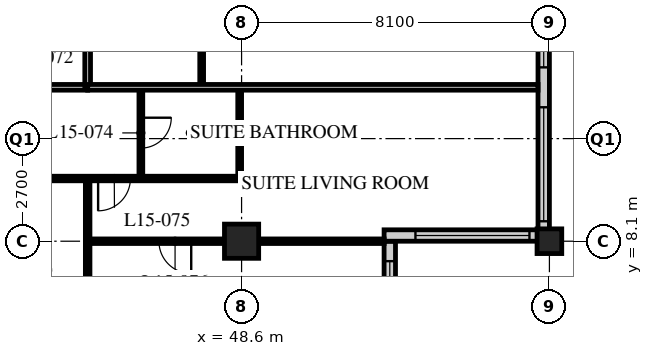
"""IFC4 building model, lengths in metres.
Left out: names, types, materials, properties, quantities, classifications, styles, units other than length and angle.
Written with IfcOpenShell. Run it as: python <this file> out.ifc"""

import sys

from ifc_helpers import new_model, si_unit, direction, frame, frame_2d, origin, origin_2d, place, context, subcontext, project, spatial, rectangle, hollow_rectangle, extrude, element, fill, save


model = new_model("IFC4")
c1 = context("Model", 3, precision=1e-05, world=origin(), true_north=direction((0.0, 1.0)))
c2 = subcontext(c1, "Body", "Model", "MODEL_VIEW")
j1 = project(units=[si_unit("LENGTHUNIT", "METRE"), si_unit("PLANEANGLEUNIT", "RADIAN")], contexts=[c1])
p1 = place(None, origin())
s1 = spatial("IfcSite", under=j1, at=p1, CompositionType="ELEMENT")
p2 = place(p1, origin())
s2 = spatial("IfcBuilding", under=s1, at=p2, CompositionType="ELEMENT")
p3 = place(p2, frame((0.0, 0.0, 63.6)))
s3 = spatial("IfcBuildingStorey", under=s2, at=p3, CompositionType="ELEMENT", Elevation=63.6)
p4 = place(p3, frame((48.6, 8.1, 0.0), z_axis=(0.0, 0.0, 1.0), x_axis=(1.0, 0.0, 0.0)))
e1 = element("IfcColumn", 1, at=p4, inside=s3, PredefinedType="COLUMN", context=c2, shape_type="SweptSolid", body=[
    extrude(hollow_rectangle(XDim=0.9, YDim=0.9, WallThickness=0.09, at=origin_2d()), origin(), (0.0, 0.0, 1.0), 3.4),
])
p5 = place(p3, frame((56.7, 8.1, 0.0), z_axis=(0.0, 0.0, 1.0), x_axis=(1.0, 0.0, 0.0)))
e2 = element("IfcColumn", 2, at=p5, inside=s3, PredefinedType="COLUMN", context=c2, shape_type="SweptSolid", body=[
    extrude(hollow_rectangle(XDim=0.65, YDim=0.65, WallThickness=0.05, at=origin_2d()), origin(), (0.0, 0.0, 1.0), 3.4),
])
p6 = place(p3, frame((52.5, 4.35, 0.0), z_axis=(0.0, 0.0, 1.0), x_axis=(0.0, 1.0, 0.0)))
e3 = element("IfcWall", 3, at=p6, inside=s3, PredefinedType="SOLIDWALL", context=c2, shape_type="SweptSolid", body=[
    extrude(rectangle(XDim=3.75, YDim=0.3, at=frame_2d((1.875, 0.0))), origin(), (0.0, 0.0, 1.0), 3.19),
])
p7 = place(p6, frame((0.225, 0.0, 0.9)))
e4 = element("IfcOpeningElement", 4, at=p7, cuts=e3, PredefinedType="OPENING", context=c2, shape_type="SweptSolid", body=[
    extrude(rectangle(XDim=3.0, YDim=1.5, at=frame_2d((1.5, 0.75))), frame((0.0, 0.16, 0.0), z_axis=(0.0, -1.0, 0.0), x_axis=(1.0, 0.0, 0.0)), (0.0, 0.0, 1.0), 0.32),
])
p8 = place(p3, frame((52.35, 8.25, 0.0), z_axis=(0.0, 0.0, 1.0), x_axis=(1.0, 0.0, 0.0)))
e5 = element("IfcWall", 5, at=p8, inside=s3, PredefinedType="SOLIDWALL", context=c2, shape_type="SweptSolid", body=[
    extrude(rectangle(XDim=4.35, YDim=0.3, at=frame_2d((2.175, 0.0))), origin(), (0.0, 0.0, 1.0), 3.19),
])
p9 = place(p8, frame((0.825, 0.0, 0.9)))
e6 = element("IfcOpeningElement", 6, at=p9, cuts=e5, PredefinedType="OPENING", context=c2, shape_type="SweptSolid", body=[
    extrude(rectangle(XDim=3.0, YDim=1.5, at=frame_2d((1.5, 0.75))), frame((0.0, 0.16, 0.0), z_axis=(0.0, -1.0, 0.0), x_axis=(1.0, 0.0, 0.0)), (0.0, 0.0, 1.0), 0.32),
])
p10 = place(p3, frame((56.55, 8.4, 0.0), z_axis=(0.0, 0.0, 1.0), x_axis=(0.0, 1.0, 0.0)))
e7 = element("IfcWall", 7, at=p10, inside=s3, PredefinedType="SOLIDWALL", context=c2, shape_type="SweptSolid", body=[
    extrude(rectangle(XDim=32.1, YDim=0.3, at=frame_2d((16.05, 0.0))), origin(), (0.0, 0.0, 1.0), 3.19),
])
p11 = place(p10, frame((0.225, 0.0, 0.9)))
e8 = element("IfcOpeningElement", 8, at=p11, cuts=e7, PredefinedType="OPENING", context=c2, shape_type="SweptSolid", body=[
    extrude(rectangle(XDim=3.0, YDim=2.0, at=frame_2d((1.5, 1.0))), frame((0.0, 0.16, 0.0), z_axis=(0.0, -1.0, 0.0), x_axis=(1.0, 0.0, 0.0)), (0.0, 0.0, 1.0), 0.32),
])
p12 = place(p10, frame((4.275, 0.0, 0.9)))
e9 = element("IfcOpeningElement", 9, at=p12, cuts=e7, PredefinedType="OPENING", context=c2, shape_type="SweptSolid", body=[
    extrude(rectangle(XDim=3.0, YDim=2.0, at=frame_2d((1.5, 1.0))), frame((0.0, 0.16, 0.0), z_axis=(0.0, -1.0, 0.0), x_axis=(1.0, 0.0, 0.0)), (0.0, 0.0, 1.0), 0.32),
])
p13 = place(p10, frame((8.325, 0.0, 0.9)))
e10 = element("IfcOpeningElement", 10, at=p13, cuts=e7, PredefinedType="OPENING", context=c2, shape_type="SweptSolid", body=[
    extrude(rectangle(XDim=3.0, YDim=2.0, at=frame_2d((1.5, 1.0))), frame((0.0, 0.16, 0.0), z_axis=(0.0, -1.0, 0.0), x_axis=(1.0, 0.0, 0.0)), (0.0, 0.0, 1.0), 0.32),
])
p14 = place(p10, frame((12.375, 0.0, 0.9)))
e11 = element("IfcOpeningElement", 11, at=p14, cuts=e7, PredefinedType="OPENING", context=c2, shape_type="SweptSolid", body=[
    extrude(rectangle(XDim=3.0, YDim=2.0, at=frame_2d((1.5, 1.0))), frame((0.0, 0.16, 0.0), z_axis=(0.0, -1.0, 0.0), x_axis=(1.0, 0.0, 0.0)), (0.0, 0.0, 1.0), 0.32),
])
p15 = place(p10, frame((16.425, 0.0, 0.9)))
e12 = element("IfcOpeningElement", 12, at=p15, cuts=e7, PredefinedType="OPENING", context=c2, shape_type="SweptSolid", body=[
    extrude(rectangle(XDim=3.0, YDim=2.0, at=frame_2d((1.5, 1.0))), frame((0.0, 0.16, 0.0), z_axis=(0.0, -1.0, 0.0), x_axis=(1.0, 0.0, 0.0)), (0.0, 0.0, 1.0), 0.32),
])
p16 = place(p10, frame((20.475, 0.0, 0.9)))
e13 = element("IfcOpeningElement", 13, at=p16, cuts=e7, PredefinedType="OPENING", context=c2, shape_type="SweptSolid", body=[
    extrude(rectangle(XDim=3.0, YDim=2.0, at=frame_2d((1.5, 1.0))), frame((0.0, 0.16, 0.0), z_axis=(0.0, -1.0, 0.0), x_axis=(1.0, 0.0, 0.0)), (0.0, 0.0, 1.0), 0.32),
])
p17 = place(p10, frame((24.525, 0.0, 0.9)))
e14 = element("IfcOpeningElement", 14, at=p17, cuts=e7, PredefinedType="OPENING", context=c2, shape_type="SweptSolid", body=[
    extrude(rectangle(XDim=3.0, YDim=2.0, at=frame_2d((1.5, 1.0))), frame((0.0, 0.16, 0.0), z_axis=(0.0, -1.0, 0.0), x_axis=(1.0, 0.0, 0.0)), (0.0, 0.0, 1.0), 0.32),
])
p18 = place(p10, frame((28.575, 0.0, 0.9)))
e15 = element("IfcOpeningElement", 15, at=p18, cuts=e7, PredefinedType="OPENING", context=c2, shape_type="SweptSolid", body=[
    extrude(rectangle(XDim=3.0, YDim=2.0, at=frame_2d((1.5, 1.0))), frame((0.0, 0.16, 0.0), z_axis=(0.0, -1.0, 0.0), x_axis=(1.0, 0.0, 0.0)), (0.0, 0.0, 1.0), 0.32),
])
p19 = place(p3, frame((8.1, 12.15, 0.0), z_axis=(0.0, 0.0, 1.0), x_axis=(1.0, 0.0, 0.0)))
e16 = element("IfcWall", 16, at=p19, inside=s3, PredefinedType="PARTITIONING", context=c2, shape_type="SweptSolid", body=[
    extrude(rectangle(XDim=36.45, YDim=0.15, at=frame_2d((18.225, 0.0))), origin(), (0.0, 0.0, 1.0), 3.19),
])
p20 = place(p19, frame((4.35, 0.0, 0.0)))
e17 = element("IfcOpeningElement", 17, at=p20, cuts=e16, PredefinedType="OPENING", context=c2, shape_type="SweptSolid", body=[
    extrude(rectangle(XDim=1.0, YDim=2.1, at=frame_2d((0.5, 1.05))), frame((0.0, 0.085, 0.0), z_axis=(0.0, -1.0, 0.0), x_axis=(1.0, 0.0, 0.0)), (0.0, 0.0, 1.0), 0.17),
])
p21 = place(p19, frame((10.55, 0.0, 0.0)))
e18 = element("IfcOpeningElement", 18, at=p21, cuts=e16, PredefinedType="OPENING", context=c2, shape_type="SweptSolid", body=[
    extrude(rectangle(XDim=1.0, YDim=2.1, at=frame_2d((0.5, 1.05))), frame((0.0, 0.085, 0.0), z_axis=(0.0, -1.0, 0.0), x_axis=(1.0, 0.0, 0.0)), (0.0, 0.0, 1.0), 0.17),
])
p22 = place(p19, frame((14.6, 0.0, 0.0)))
e19 = element("IfcOpeningElement", 19, at=p22, cuts=e16, PredefinedType="OPENING", context=c2, shape_type="SweptSolid", body=[
    extrude(rectangle(XDim=1.0, YDim=2.1, at=frame_2d((0.5, 1.05))), frame((0.0, 0.085, 0.0), z_axis=(0.0, -1.0, 0.0), x_axis=(1.0, 0.0, 0.0)), (0.0, 0.0, 1.0), 0.17),
])
p23 = place(p19, frame((18.65, 0.0, 0.0)))
e20 = element("IfcOpeningElement", 20, at=p23, cuts=e16, PredefinedType="OPENING", context=c2, shape_type="SweptSolid", body=[
    extrude(rectangle(XDim=1.0, YDim=2.1, at=frame_2d((0.5, 1.05))), frame((0.0, 0.085, 0.0), z_axis=(0.0, -1.0, 0.0), x_axis=(1.0, 0.0, 0.0)), (0.0, 0.0, 1.0), 0.17),
])
p24 = place(p19, frame((22.7, 0.0, 0.0)))
e21 = element("IfcOpeningElement", 21, at=p24, cuts=e16, PredefinedType="OPENING", context=c2, shape_type="SweptSolid", body=[
    extrude(rectangle(XDim=1.0, YDim=2.1, at=frame_2d((0.5, 1.05))), frame((0.0, 0.085, 0.0), z_axis=(0.0, -1.0, 0.0), x_axis=(1.0, 0.0, 0.0)), (0.0, 0.0, 1.0), 0.17),
])
p25 = place(p19, frame((24.6, 0.0, 0.0)))
e22 = element("IfcOpeningElement", 22, at=p25, cuts=e16, PredefinedType="OPENING", context=c2, shape_type="SweptSolid", body=[
    extrude(rectangle(XDim=1.0, YDim=2.1, at=frame_2d((0.5, 1.05))), frame((0.0, 0.085, 0.0), z_axis=(0.0, -1.0, 0.0), x_axis=(1.0, 0.0, 0.0)), (0.0, 0.0, 1.0), 0.17),
])
p26 = place(p19, frame((30.8, 0.0, 0.0)))
e23 = element("IfcOpeningElement", 23, at=p26, cuts=e16, PredefinedType="OPENING", context=c2, shape_type="SweptSolid", body=[
    extrude(rectangle(XDim=1.0, YDim=2.1, at=frame_2d((0.5, 1.05))), frame((0.0, 0.085, 0.0), z_axis=(0.0, -1.0, 0.0), x_axis=(1.0, 0.0, 0.0)), (0.0, 0.0, 1.0), 0.17),
])
p27 = place(p19, frame((1.525, 0.0, 0.0)))
e24 = element("IfcOpeningElement", 24, at=p27, cuts=e16, PredefinedType="OPENING", context=c2, shape_type="SweptSolid", body=[
    extrude(rectangle(XDim=1.0, YDim=2.1, at=frame_2d((0.5, 1.05))), frame((0.0, 0.085, 0.0), z_axis=(0.0, -1.0, 0.0), x_axis=(1.0, 0.0, 0.0)), (0.0, 0.0, 1.0), 0.17),
])
p28 = place(p19, frame((33.925, 0.0, 0.0)))
e25 = element("IfcOpeningElement", 25, at=p28, cuts=e16, PredefinedType="OPENING", context=c2, shape_type="SweptSolid", body=[
    extrude(rectangle(XDim=1.0, YDim=2.1, at=frame_2d((0.5, 1.05))), frame((0.0, 0.085, 0.0), z_axis=(0.0, -1.0, 0.0), x_axis=(1.0, 0.0, 0.0)), (0.0, 0.0, 1.0), 0.17),
])
p29 = place(p3, frame((44.55, 12.15, 0.0), z_axis=(0.0, 0.0, 1.0), x_axis=(0.0, 1.0, 0.0)))
e26 = element("IfcWall", 26, at=p29, inside=s3, PredefinedType="PARTITIONING", context=c2, shape_type="SweptSolid", body=[
    extrude(rectangle(XDim=30.15, YDim=0.15, at=frame_2d((15.075, 0.0))), origin(), (0.0, 0.0, 1.0), 3.19),
])
p30 = place(p29, frame((2.45, 0.0, 0.0)))
e27 = element("IfcOpeningElement", 27, at=p30, cuts=e26, PredefinedType="OPENING", context=c2, shape_type="SweptSolid", body=[
    extrude(rectangle(XDim=1.0, YDim=2.1, at=frame_2d((0.5, 1.05))), frame((0.0, 0.085, 0.0), z_axis=(0.0, -1.0, 0.0), x_axis=(1.0, 0.0, 0.0)), (0.0, 0.0, 1.0), 0.17),
])
p31 = place(p29, frame((4.35, 0.0, 0.0)))
e28 = element("IfcOpeningElement", 28, at=p31, cuts=e26, PredefinedType="OPENING", context=c2, shape_type="SweptSolid", body=[
    extrude(rectangle(XDim=1.0, YDim=2.1, at=frame_2d((0.5, 1.05))), frame((0.0, 0.085, 0.0), z_axis=(0.0, -1.0, 0.0), x_axis=(1.0, 0.0, 0.0)), (0.0, 0.0, 1.0), 0.17),
])
p32 = place(p29, frame((8.4, 0.0, 0.0)))
e29 = element("IfcOpeningElement", 29, at=p32, cuts=e26, PredefinedType="OPENING", context=c2, shape_type="SweptSolid", body=[
    extrude(rectangle(XDim=1.0, YDim=2.1, at=frame_2d((0.5, 1.05))), frame((0.0, 0.085, 0.0), z_axis=(0.0, -1.0, 0.0), x_axis=(1.0, 0.0, 0.0)), (0.0, 0.0, 1.0), 0.17),
])
p33 = place(p29, frame((14.6, 0.0, 0.0)))
e30 = element("IfcOpeningElement", 30, at=p33, cuts=e26, PredefinedType="OPENING", context=c2, shape_type="SweptSolid", body=[
    extrude(rectangle(XDim=1.0, YDim=2.1, at=frame_2d((0.5, 1.05))), frame((0.0, 0.085, 0.0), z_axis=(0.0, -1.0, 0.0), x_axis=(1.0, 0.0, 0.0)), (0.0, 0.0, 1.0), 0.17),
])
p34 = place(p29, frame((21.65, 0.0, 0.0)))
e31 = element("IfcOpeningElement", 31, at=p34, cuts=e26, PredefinedType="OPENING", context=c2, shape_type="SweptSolid", body=[
    extrude(rectangle(XDim=1.0, YDim=2.1, at=frame_2d((0.5, 1.05))), frame((0.0, 0.085, 0.0), z_axis=(0.0, -1.0, 0.0), x_axis=(1.0, 0.0, 0.0)), (0.0, 0.0, 1.0), 0.17),
])
p35 = place(p29, frame((26.7, 0.0, 0.0)))
e32 = element("IfcOpeningElement", 32, at=p35, cuts=e26, PredefinedType="OPENING", context=c2, shape_type="SweptSolid", body=[
    extrude(rectangle(XDim=1.0, YDim=2.1, at=frame_2d((0.5, 1.05))), frame((0.0, 0.085, 0.0), z_axis=(0.0, -1.0, 0.0), x_axis=(1.0, 0.0, 0.0)), (0.0, 0.0, 1.0), 0.17),
])
p36 = place(p3, frame((47.55, 12.15, 0.0), z_axis=(0.0, 0.0, 1.0), x_axis=(0.0, 1.0, 0.0)))
e33 = element("IfcWall", 33, at=p36, inside=s3, PredefinedType="PARTITIONING", context=c2, shape_type="SweptSolid", body=[
    extrude(rectangle(XDim=2.3, YDim=0.1, at=frame_2d((1.15, 0.0))), origin(), (0.0, 0.0, 1.0), 3.19),
])
p37 = place(p3, frame((40.5, 9.75, 0.0), z_axis=(0.0, 0.0, 1.0), x_axis=(1.0, 0.0, 0.0)))
e34 = element("IfcWall", 34, at=p37, inside=s3, PredefinedType="PARTITIONING", context=c2, shape_type="SweptSolid", body=[
    extrude(rectangle(XDim=8.05, YDim=0.12, at=frame_2d((4.025, 0.0))), origin(), (0.0, 0.0, 1.0), 3.19),
])
p38 = place(p37, frame((0.475, 0.0, 0.0)))
e35 = element("IfcOpeningElement", 35, at=p38, cuts=e34, PredefinedType="OPENING", context=c2, shape_type="SweptSolid", body=[
    extrude(rectangle(XDim=0.85, YDim=2.1, at=frame_2d((0.425, 1.05))), frame((0.0, 0.07, 0.0), z_axis=(0.0, -1.0, 0.0), x_axis=(1.0, 0.0, 0.0)), (0.0, 0.0, 1.0), 0.14),
])
p39 = place(p37, frame((4.325, 0.0, 0.0)))
e36 = element("IfcOpeningElement", 36, at=p39, cuts=e34, PredefinedType="OPENING", context=c2, shape_type="SweptSolid", body=[
    extrude(rectangle(XDim=0.85, YDim=2.1, at=frame_2d((0.425, 1.05))), frame((0.0, 0.07, 0.0), z_axis=(0.0, -1.0, 0.0), x_axis=(1.0, 0.0, 0.0)), (0.0, 0.0, 1.0), 0.14),
])
p40 = place(p3, frame((45.95, 12.15, 0.0), z_axis=(0.0, 0.0, 1.0), x_axis=(0.0, -1.0, 0.0)))
e37 = element("IfcWall", 37, at=p40, inside=s3, PredefinedType="PARTITIONING", context=c2, shape_type="SweptSolid", body=[
    extrude(rectangle(XDim=2.4, YDim=0.1, at=frame_2d((1.2, 0.0))), origin(), (0.0, 0.0, 1.0), 3.19),
])
p41 = place(p40, frame((0.8, 0.0, 0.0)))
e38 = element("IfcOpeningElement", 38, at=p41, cuts=e37, PredefinedType="OPENING", context=c2, shape_type="SweptSolid", body=[
    extrude(rectangle(XDim=0.8, YDim=2.1, at=frame_2d((0.4, 1.05))), frame((0.0, 0.06, 0.0), z_axis=(0.0, -1.0, 0.0), x_axis=(1.0, 0.0, 0.0)), (0.0, 0.0, 1.0), 0.12),
])
p42 = place(p3, frame((48.55, 12.15, 0.0), z_axis=(0.0, 0.0, 1.0), x_axis=(0.0, -1.0, 0.0)))
e39 = element("IfcWall", 39, at=p42, inside=s3, PredefinedType="PARTITIONING", context=c2, shape_type="SweptSolid", body=[
    extrude(rectangle(XDim=2.4, YDim=0.1, at=frame_2d((1.2, 0.0))), origin(), (0.0, 0.0, 1.0), 2.578),
])
p43 = place(p3, frame((44.55, 9.75, 0.0), z_axis=(0.0, 0.0, 1.0), x_axis=(0.0, -1.0, 0.0)))
e40 = element("IfcWall", 40, at=p43, inside=s3, PredefinedType="PARTITIONING", context=c2, shape_type="SweptSolid", body=[
    extrude(rectangle(XDim=9.45, YDim=0.12, at=frame_2d((4.725, 0.0))), origin(), (0.0, 0.0, 1.0), 3.19),
])
p44 = place(p3, frame((44.55, 8.1, 0.0), z_axis=(0.0, 0.0, 1.0), x_axis=(1.0, 0.0, 0.0)))
e41 = element("IfcWall", 41, at=p44, inside=s3, PredefinedType="PARTITIONING", context=c2, shape_type="SweptSolid", body=[
    extrude(rectangle(XDim=7.8, YDim=0.12, at=frame_2d((3.9, 0.0))), origin(), (0.0, 0.0, 1.0), 2.578),
])
p45 = place(p44, frame((1.875, 0.0, 0.0)))
e42 = element("IfcOpeningElement", 42, at=p45, cuts=e41, PredefinedType="OPENING", context=c2, shape_type="SweptSolid", body=[
    extrude(rectangle(XDim=0.85, YDim=2.1, at=frame_2d((0.425, 1.05))), frame((0.0, 0.07, 0.0), z_axis=(0.0, -1.0, 0.0), x_axis=(1.0, 0.0, 0.0)), (0.0, 0.0, 1.0), 0.14),
])
p46 = place(p3, frame((44.55, 12.15, 0.0), z_axis=(0.0, 0.0, 1.0), x_axis=(1.0, 0.0, 0.0)))
e43 = element("IfcWall", 43, at=p46, inside=s3, PredefinedType="PARTITIONING", context=c2, shape_type="SweptSolid", body=[
    extrude(rectangle(XDim=11.85, YDim=0.15, at=frame_2d((5.925, 0.0))), origin(), (0.0, 0.0, 1.0), 3.19),
])
p47 = place(p7, origin())
e44 = element("IfcWindow", 44, at=p47, inside=s3, PartitioningType="SINGLE_PANEL", PredefinedType="WINDOW", context=c2, shape_type="SweptSolid", body=[
    extrude(rectangle(XDim=3.0, YDim=1.5, at=frame_2d((1.5, 0.75))), frame((0.0, 0.03, 0.0), z_axis=(0.0, -1.0, 0.0), x_axis=(1.0, 0.0, 0.0)), (0.0, 0.0, 1.0), 0.06),
])
fill(e4, e44)
p48 = place(p9, origin())
e45 = element("IfcWindow", 45, at=p48, inside=s3, PartitioningType="SINGLE_PANEL", PredefinedType="WINDOW", context=c2, shape_type="SweptSolid", body=[
    extrude(rectangle(XDim=3.0, YDim=1.5, at=frame_2d((1.5, 0.75))), frame((0.0, 0.03, 0.0), z_axis=(0.0, -1.0, 0.0), x_axis=(1.0, 0.0, 0.0)), (0.0, 0.0, 1.0), 0.06),
])
fill(e6, e45)
p49 = place(p11, origin())
e46 = element("IfcWindow", 46, at=p49, inside=s3, PartitioningType="SINGLE_PANEL", PredefinedType="WINDOW", context=c2, shape_type="SweptSolid", body=[
    extrude(rectangle(XDim=3.0, YDim=2.0, at=frame_2d((1.5, 1.0))), frame((0.0, 0.03, 0.0), z_axis=(0.0, -1.0, 0.0), x_axis=(1.0, 0.0, 0.0)), (0.0, 0.0, 1.0), 0.06),
])
fill(e8, e46)
p50 = place(p12, origin())
e47 = element("IfcWindow", 47, at=p50, inside=s3, PartitioningType="SINGLE_PANEL", PredefinedType="WINDOW", context=c2, shape_type="SweptSolid", body=[
    extrude(rectangle(XDim=3.0, YDim=2.0, at=frame_2d((1.5, 1.0))), frame((0.0, 0.03, 0.0), z_axis=(0.0, -1.0, 0.0), x_axis=(1.0, 0.0, 0.0)), (0.0, 0.0, 1.0), 0.06),
])
fill(e9, e47)
p51 = place(p41, origin())
e48 = element("IfcDoor", 48, at=p51, inside=s3, OperationType="SINGLE_SWING_LEFT", PredefinedType="DOOR", context=c2, shape_type="SweptSolid", body=[
    extrude(rectangle(XDim=0.8, YDim=2.1, at=frame_2d((0.4, 1.05))), frame((0.0, 0.025, 0.0), z_axis=(0.0, -1.0, 0.0), x_axis=(1.0, 0.0, 0.0)), (0.0, 0.0, 1.0), 0.05),
])
fill(e38, e48)
p52 = place(p39, origin())
e49 = element("IfcDoor", 49, at=p52, inside=s3, OperationType="SINGLE_SWING_RIGHT", PredefinedType="DOOR", context=c2, shape_type="SweptSolid", body=[
    extrude(rectangle(XDim=0.85, YDim=2.1, at=frame_2d((0.425, 1.05))), frame((0.0, 0.025, 0.0), z_axis=(0.0, -1.0, 0.0), x_axis=(1.0, 0.0, 0.0)), (0.0, 0.0, 1.0), 0.05),
])
fill(e36, e49)
p53 = place(p45, origin())
e50 = element("IfcDoor", 50, at=p53, inside=s3, OperationType="SINGLE_SWING_LEFT", PredefinedType="DOOR", context=c2, shape_type="SweptSolid", body=[
    extrude(rectangle(XDim=0.85, YDim=2.1, at=frame_2d((0.425, 1.05))), frame((0.0, 0.025, 0.0), z_axis=(0.0, -1.0, 0.0), x_axis=(1.0, 0.0, 0.0)), (0.0, 0.0, 1.0), 0.05),
])
fill(e42, e50)
save(model, sys.argv[1])
